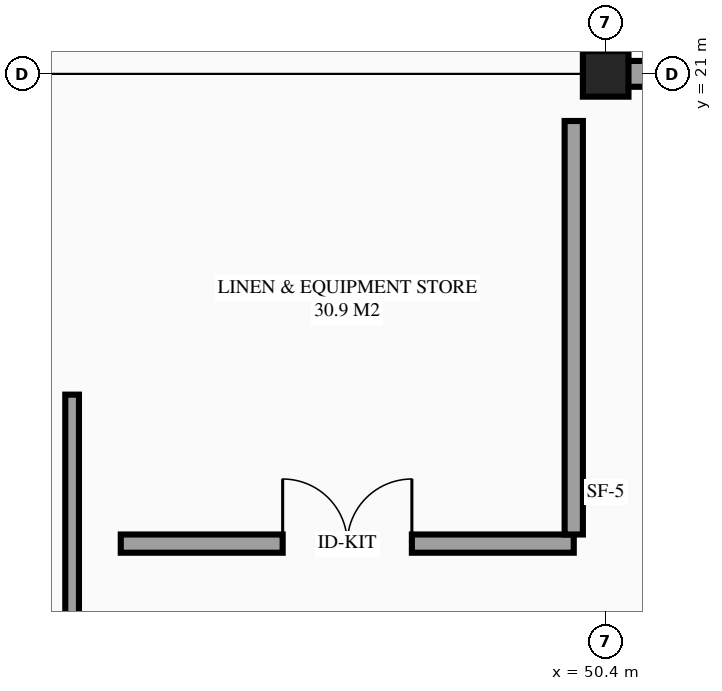
"""IFC4 building model, lengths in metres.
Left out: names, types, materials, properties, quantities, classifications, styles, units other than length and angle.
Written with IfcOpenShell. Run it as: python <this file> out.ifc"""

import sys

from ifc_helpers import new_model, si_unit, direction, frame, frame_2d, origin, origin_2d, place, context, subcontext, project, spatial, rectangle, extrude, element, fill, save


model = new_model("IFC4")
c1 = context("Model", 3, precision=1e-05, world=origin(), true_north=direction((0.0, 1.0)))
c2 = subcontext(c1, "Body", "Model", "MODEL_VIEW")
j1 = project(units=[si_unit("LENGTHUNIT", "METRE"), si_unit("PLANEANGLEUNIT", "RADIAN")], contexts=[c1])
p1 = place(None, origin())
s1 = spatial("IfcSite", under=j1, at=p1, CompositionType="ELEMENT")
p2 = place(p1, origin())
s2 = spatial("IfcBuilding", under=s1, at=p2, CompositionType="ELEMENT")
p3 = place(p2, frame((0.0, 0.0, 29.1)))
s3 = spatial("IfcBuildingStorey", under=s2, at=p3, CompositionType="ELEMENT", Elevation=29.1)
p4 = place(p3, frame((50.4, 21.0, 0.0), z_axis=(0.0, 0.0, 1.0), x_axis=(1.0, 0.0, 0.0)))
e1 = element("IfcColumn", 1, at=p4, inside=s3, PredefinedType="COLUMN", context=c2, shape_type="SweptSolid", body=[
    extrude(rectangle(XDim=0.6, YDim=0.6, at=origin_2d()), origin(), (0.0, 0.0, 1.0), 3.6),
])
p5 = place(p3, frame((50.4, 21.0, 0.0), z_axis=(0.0, 0.0, 1.0), x_axis=(0.0, 1.0, 0.0)))
e2 = element("IfcWall", 2, at=p5, inside=s3, PredefinedType="STANDARD", context=c2, shape_type="SweptSolid", body=[
    extrude(rectangle(XDim=16.8, YDim=0.34, at=frame_2d((8.4, 0.0))), origin(), (0.0, 0.0, 1.0), 2.68),
])
p6 = place(p5, frame((2.4, 0.0, 0.85)))
e3 = element("IfcOpeningElement", 3, at=p6, cuts=e2, PredefinedType="OPENING", context=c2, shape_type="SweptSolid", body=[
    extrude(rectangle(XDim=1.5, YDim=1.5, at=frame_2d((0.75, 0.75))), frame((0.0, 0.18, 0.0), z_axis=(0.0, -1.0, 0.0), x_axis=(1.0, 0.0, 0.0)), (0.0, 0.0, 1.0), 0.36),
])
p7 = place(p5, frame((9.05, 0.0, 0.85)))
e4 = element("IfcOpeningElement", 4, at=p7, cuts=e2, PredefinedType="OPENING", context=c2, shape_type="SweptSolid", body=[
    extrude(rectangle(XDim=1.2, YDim=1.5, at=frame_2d((0.6, 0.75))), frame((0.0, 0.18, 0.0), z_axis=(0.0, -1.0, 0.0), x_axis=(1.0, 0.0, 0.0)), (0.0, 0.0, 1.0), 0.36),
])
p8 = place(p3, frame((43.38, 12.91, 0.0), z_axis=(0.0, 0.0, 1.0), x_axis=(0.0, 1.0, 0.0)))
e5 = element("IfcWall", 5, at=p8, inside=s3, PredefinedType="PARTITIONING", context=c2, shape_type="SweptSolid", body=[
    extrude(rectangle(XDim=3.87, YDim=0.18, at=frame_2d((1.935, 0.0))), origin(), (0.0, 0.0, 1.0), 3.375),
])
p9 = place(p3, frame((44.02, 14.82, 0.0), z_axis=(0.0, 0.0, 1.0), x_axis=(1.0, 0.0, 0.0)))
e6 = element("IfcWall", 6, at=p9, inside=s3, PredefinedType="PARTITIONING", context=c2, shape_type="SweptSolid", body=[
    extrude(rectangle(XDim=5.96, YDim=0.24, at=frame_2d((2.98, 0.0))), origin(), (0.0, 0.0, 1.0), 3.375),
])
p10 = place(p9, frame((2.13, 0.0, 0.0)))
e7 = element("IfcOpeningElement", 7, at=p10, cuts=e6, PredefinedType="OPENING", context=c2, shape_type="SweptSolid", body=[
    extrude(rectangle(XDim=1.7, YDim=2.2, at=frame_2d((0.85, 1.1))), frame((0.0, 0.13, 0.0), z_axis=(0.0, -1.0, 0.0), x_axis=(1.0, 0.0, 0.0)), (0.0, 0.0, 1.0), 0.26),
])
p11 = place(p3, frame((49.98, 14.94, 0.0), z_axis=(0.0, 0.0, 1.0), x_axis=(0.0, 1.0, 0.0)))
e8 = element("IfcWall", 8, at=p11, inside=s3, PredefinedType="PARTITIONING", context=c2, shape_type="SweptSolid", body=[
    extrude(rectangle(XDim=5.44, YDim=0.24, at=frame_2d((2.72, 0.0))), origin(), (0.0, 0.0, 1.0), 3.375),
])
p12 = place(p3, frame((58.8, 21.0, 0.0), z_axis=(0.0, 0.0, 1.0), x_axis=(-1.0, 0.0, 0.0)))
e9 = element("IfcWall", 9, at=p12, inside=s3, PredefinedType="STANDARD", context=c2, shape_type="SweptSolid", body=[
    extrude(rectangle(XDim=8.4, YDim=0.34, at=frame_2d((4.2, 0.0))), origin(), (0.0, 0.0, 1.0), 3.075),
])
p13 = place(p12, frame((3.3, 0.0, 0.75)))
e10 = element("IfcOpeningElement", 10, at=p13, cuts=e9, PredefinedType="OPENING", context=c2, shape_type="SweptSolid", body=[
    extrude(rectangle(XDim=1.8, YDim=1.5, at=frame_2d((0.9, 0.75))), frame((0.0, 0.18, 0.0), z_axis=(0.0, -1.0, 0.0), x_axis=(1.0, 0.0, 0.0)), (0.0, 0.0, 1.0), 0.36),
])
p14 = place(p10, origin())
e11 = element("IfcDoor", 11, at=p14, inside=s3, OperationType="DOUBLE_DOOR_SINGLE_SWING", PredefinedType="DOOR", context=c2, shape_type="SweptSolid", body=[
    extrude(rectangle(XDim=1.7, YDim=2.2, at=frame_2d((0.85, 1.1))), frame((0.0, 0.025, 0.0), z_axis=(0.0, -1.0, 0.0), x_axis=(1.0, 0.0, 0.0)), (0.0, 0.0, 1.0), 0.05),
])
fill(e7, e11)
save(model, sys.argv[1])
